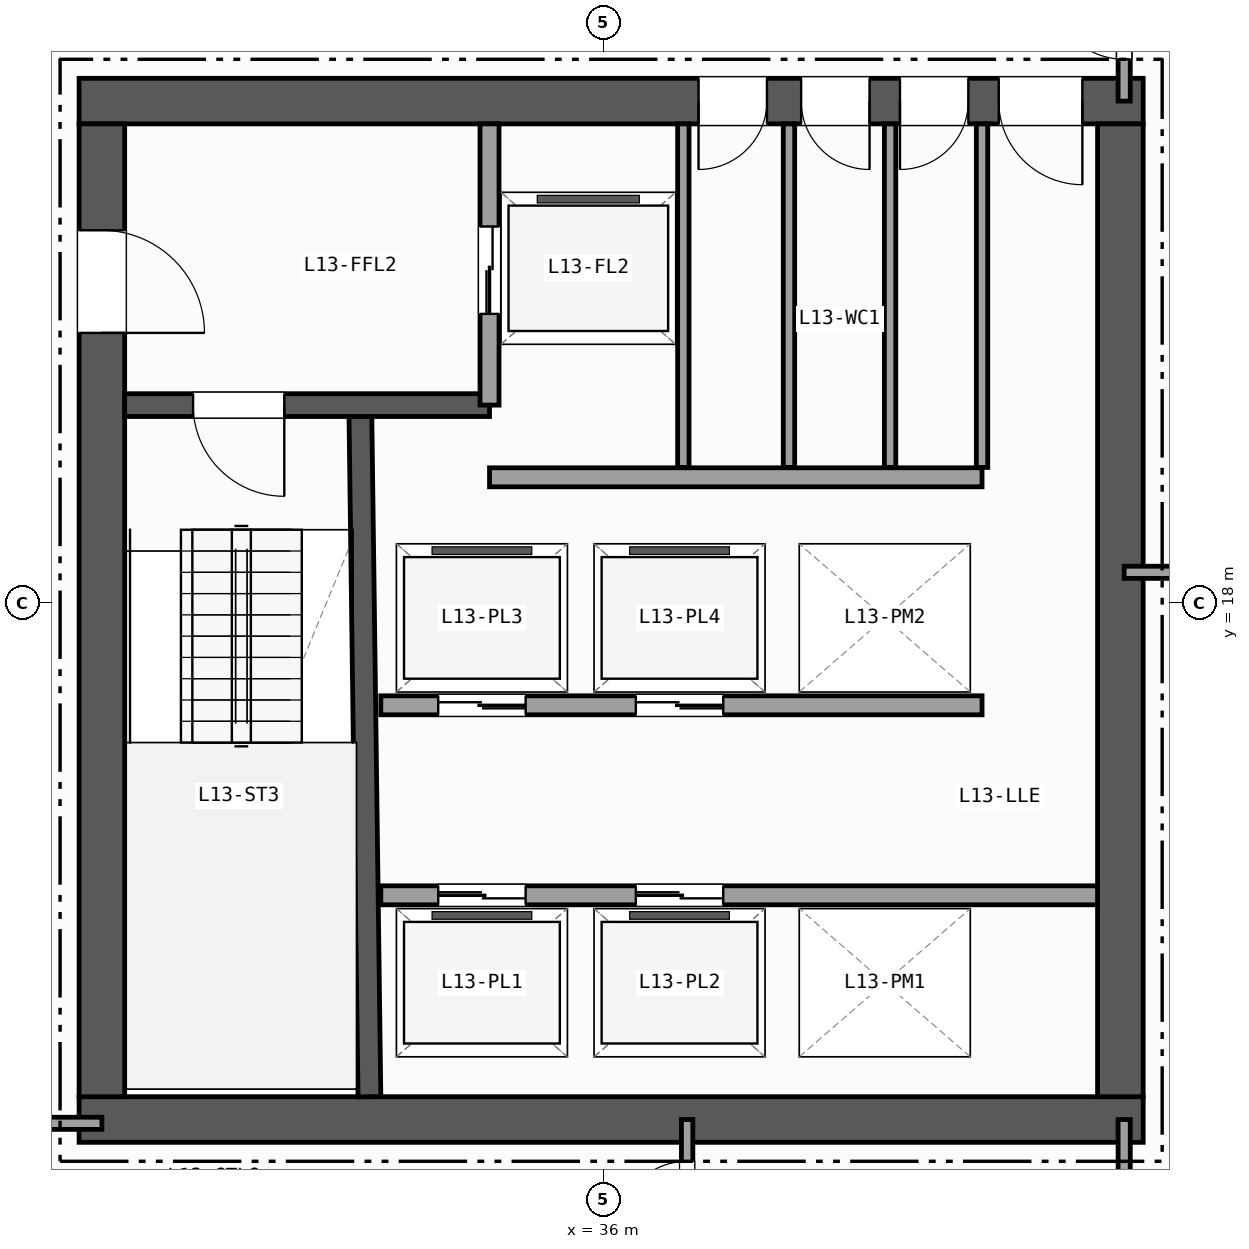
"""IFC4 building model, lengths in metres.
Left out: names, types, materials, properties, quantities, classifications, styles, units other than length and angle.
Written with IfcOpenShell. Run it as: python <this file> out.ifc"""

import sys

from ifc_helpers import new_model, si_unit, direction, frame, frame_2d, origin, place, context, subcontext, project, spatial, rectangle, extrude, element, fill, save


model = new_model("IFC4")
c1 = context("Model", 3, precision=1e-05, world=origin(), true_north=direction((0.0, 1.0)))
c2 = subcontext(c1, "Body", "Model", "MODEL_VIEW")
j1 = project(units=[si_unit("LENGTHUNIT", "METRE"), si_unit("PLANEANGLEUNIT", "RADIAN")], contexts=[c1])
p1 = place(None, origin())
s1 = spatial("IfcSite", under=j1, at=p1, CompositionType="ELEMENT")
p2 = place(p1, origin())
s2 = spatial("IfcBuilding", under=s1, at=p2, CompositionType="ELEMENT")
p3 = place(p2, frame((0.0, 0.0, 58.2)))
s3 = spatial("IfcBuildingStorey", under=s2, at=p3, CompositionType="ELEMENT", Elevation=58.2)
p4 = place(p3, frame((29.1, 11.2, 0.0), z_axis=(0.0, 0.0, 1.0), x_axis=(1.0, 0.0, 0.0)))
e1 = element("IfcWall", 1, at=p4, inside=s3, PredefinedType="SHEAR", context=c2, shape_type="SweptSolid", body=[
    extrude(rectangle(XDim=14.0, YDim=0.6, at=frame_2d((7.0, 0.0))), origin(), (0.0, 0.0, 1.0), 3.42),
])
p5 = place(p3, frame((43.1, 24.6, 0.0), z_axis=(0.0, 0.0, 1.0), x_axis=(-1.0, 0.0, 0.0)))
e2 = element("IfcWall", 2, at=p5, inside=s3, PredefinedType="SHEAR", context=c2, shape_type="SweptSolid", body=[
    extrude(rectangle(XDim=14.0, YDim=0.6, at=frame_2d((7.0, 0.0))), origin(), (0.0, 0.0, 1.0), 3.42),
])
p6 = place(p5, frame((0.8, 0.0, 0.0)))
e3 = element("IfcOpeningElement", 3, at=p6, cuts=e2, PredefinedType="OPENING", context=c2, shape_type="SweptSolid", body=[
    extrude(rectangle(XDim=1.1, YDim=2.15, at=frame_2d((0.55, 1.075))), frame((0.0, 0.31, 0.0), z_axis=(0.0, -1.0, 0.0), x_axis=(1.0, 0.0, 0.0)), (0.0, 0.0, 1.0), 0.62),
])
p7 = place(p5, frame((2.3, 0.0, 0.0)))
e4 = element("IfcOpeningElement", 4, at=p7, cuts=e2, PredefinedType="OPENING", context=c2, shape_type="SweptSolid", body=[
    extrude(rectangle(XDim=0.9, YDim=2.1, at=frame_2d((0.45, 1.05))), frame((0.0, 0.31, 0.0), z_axis=(0.0, -1.0, 0.0), x_axis=(1.0, 0.0, 0.0)), (0.0, 0.0, 1.0), 0.62),
])
p8 = place(p5, frame((3.6, 0.0, 0.0)))
e5 = element("IfcOpeningElement", 5, at=p8, cuts=e2, PredefinedType="OPENING", context=c2, shape_type="SweptSolid", body=[
    extrude(rectangle(XDim=0.9, YDim=2.1, at=frame_2d((0.45, 1.05))), frame((0.0, 0.31, 0.0), z_axis=(0.0, -1.0, 0.0), x_axis=(1.0, 0.0, 0.0)), (0.0, 0.0, 1.0), 0.62),
])
p9 = place(p5, frame((4.95, 0.0, 0.0)))
e6 = element("IfcOpeningElement", 6, at=p9, cuts=e2, PredefinedType="OPENING", context=c2, shape_type="SweptSolid", body=[
    extrude(rectangle(XDim=0.9, YDim=2.1, at=frame_2d((0.45, 1.05))), frame((0.0, 0.31, 0.0), z_axis=(0.0, -1.0, 0.0), x_axis=(1.0, 0.0, 0.0)), (0.0, 0.0, 1.0), 0.62),
])
p10 = place(p3, frame((29.4, 24.3, 0.0), z_axis=(0.0, 0.0, 1.0), x_axis=(0.0, -1.0, 0.0)))
e7 = element("IfcWall", 7, at=p10, inside=s3, PredefinedType="SHEAR", context=c2, shape_type="SweptSolid", body=[
    extrude(rectangle(XDim=12.8, YDim=0.6, at=frame_2d((6.4, 0.0))), origin(), (0.0, 0.0, 1.0), 3.42),
])
p11 = place(p10, frame((1.4, 0.0, 0.0)))
e8 = element("IfcOpeningElement", 8, at=p11, cuts=e7, PredefinedType="OPENING", context=c2, shape_type="SweptSolid", body=[
    extrude(rectangle(XDim=1.35, YDim=2.15, at=frame_2d((0.675, 1.075))), frame((0.0, 0.31, 0.0), z_axis=(0.0, -1.0, 0.0), x_axis=(1.0, 0.0, 0.0)), (0.0, 0.0, 1.0), 0.62),
])
p12 = place(p3, frame((42.8, 11.5, 0.0), z_axis=(0.0, 0.0, 1.0), x_axis=(0.0, 1.0, 0.0)))
e9 = element("IfcWall", 9, at=p12, inside=s3, PredefinedType="SHEAR", context=c2, shape_type="SweptSolid", body=[
    extrude(rectangle(XDim=12.8, YDim=0.6, at=frame_2d((6.4, 0.0))), origin(), (0.0, 0.0, 1.0), 3.42),
])
p13 = place(p3, frame((32.92, 11.5, 0.0), z_axis=(0.0, 0.0, 1.0), x_axis=(-0.013244407292, 0.999912288991, 0.0)))
e10 = element("IfcWall", 10, at=p13, inside=s3, PredefinedType="SHEAR", context=c2, shape_type="SweptSolid", body=[
    extrude(rectangle(XDim=9.051, YDim=0.3, at=frame_2d((4.525, 0.0))), origin(), (0.0, 0.0, 1.0), 3.42),
])
p14 = place(p3, frame((34.5, 20.6, 0.0), z_axis=(0.0, 0.0, 1.0), x_axis=(-1.0, 0.0, 0.0)))
e11 = element("IfcWall", 11, at=p14, inside=s3, PredefinedType="SHEAR", context=c2, shape_type="SweptSolid", body=[
    extrude(rectangle(XDim=4.8, YDim=0.3, at=frame_2d((2.4, 0.0))), origin(), (0.0, 0.0, 1.0), 3.42),
])
p15 = place(p14, frame((2.7, 0.0, 0.0)))
e12 = element("IfcOpeningElement", 12, at=p15, cuts=e11, PredefinedType="OPENING", context=c2, shape_type="SweptSolid", body=[
    extrude(rectangle(XDim=1.2, YDim=2.15, at=frame_2d((0.6, 1.075))), frame((0.0, 0.16, 0.0), z_axis=(0.0, -1.0, 0.0), x_axis=(1.0, 0.0, 0.0)), (0.0, 0.0, 1.0), 0.32),
])
p16 = place(p3, frame((34.5, 20.6, 0.0), z_axis=(0.0, 0.0, 1.0), x_axis=(0.0, 1.0, 0.0)))
e13 = element("IfcWall", 13, at=p16, inside=s3, PredefinedType="PARTITIONING", context=c2, shape_type="SweptSolid", body=[
    extrude(rectangle(XDim=3.7, YDim=0.25, at=frame_2d((1.85, 0.0))), origin(), (0.0, 0.0, 1.0), 3.42),
])
p17 = place(p16, frame((1.2, 0.0, 0.0)))
e14 = element("IfcOpeningElement", 14, at=p17, cuts=e13, PredefinedType="OPENING", context=c2, shape_type="SweptSolid", body=[
    extrude(rectangle(XDim=1.15, YDim=2.15, at=frame_2d((0.575, 1.075))), frame((0.0, 0.135, 0.0), z_axis=(0.0, -1.0, 0.0), x_axis=(1.0, 0.0, 0.0)), (0.0, 0.0, 1.0), 0.27),
])
p18 = place(p3, frame((34.5, 19.65, 0.0), z_axis=(0.0, 0.0, 1.0), x_axis=(1.0, 0.0, 0.0)))
e15 = element("IfcWall", 15, at=p18, inside=s3, PredefinedType="PARTITIONING", context=c2, shape_type="SweptSolid", body=[
    extrude(rectangle(XDim=6.48, YDim=0.25, at=frame_2d((3.24, 0.0))), origin(), (0.0, 0.0, 1.0), 3.42),
])
p19 = place(p3, frame((33.07, 14.15, 0.0), z_axis=(0.0, 0.0, 1.0), x_axis=(1.0, 0.0, 0.0)))
e16 = element("IfcWall", 16, at=p19, inside=s3, PredefinedType="PARTITIONING", context=c2, shape_type="SweptSolid", body=[
    extrude(rectangle(XDim=9.43, YDim=0.25, at=frame_2d((4.715, 0.0))), origin(), (0.0, 0.0, 1.0), 3.42),
])
p20 = place(p19, frame((0.755, 0.0, 0.0)))
e17 = element("IfcOpeningElement", 17, at=p20, cuts=e16, PredefinedType="OPENING", context=c2, shape_type="SweptSolid", body=[
    extrude(rectangle(XDim=1.15, YDim=2.15, at=frame_2d((0.575, 1.075))), frame((0.0, 0.135, 0.0), z_axis=(0.0, -1.0, 0.0), x_axis=(1.0, 0.0, 0.0)), (0.0, 0.0, 1.0), 0.27),
])
p21 = place(p19, frame((3.355, 0.0, 0.0)))
e18 = element("IfcOpeningElement", 18, at=p21, cuts=e16, PredefinedType="OPENING", context=c2, shape_type="SweptSolid", body=[
    extrude(rectangle(XDim=1.15, YDim=2.15, at=frame_2d((0.575, 1.075))), frame((0.0, 0.135, 0.0), z_axis=(0.0, -1.0, 0.0), x_axis=(1.0, 0.0, 0.0)), (0.0, 0.0, 1.0), 0.27),
])
p22 = place(p3, frame((40.98, 16.65, 0.0), z_axis=(0.0, 0.0, 1.0), x_axis=(-1.0, 0.0, 0.0)))
e19 = element("IfcWall", 19, at=p22, inside=s3, PredefinedType="PARTITIONING", context=c2, shape_type="SweptSolid", body=[
    extrude(rectangle(XDim=7.91, YDim=0.25, at=frame_2d((3.955, 0.0))), origin(), (0.0, 0.0, 1.0), 3.42),
])
p23 = place(p22, frame((6.005, 0.0, 0.0)))
e20 = element("IfcOpeningElement", 20, at=p23, cuts=e19, PredefinedType="OPENING", context=c2, shape_type="SweptSolid", body=[
    extrude(rectangle(XDim=1.15, YDim=2.15, at=frame_2d((0.575, 1.075))), frame((0.0, 0.135, 0.0), z_axis=(0.0, -1.0, 0.0), x_axis=(1.0, 0.0, 0.0)), (0.0, 0.0, 1.0), 0.27),
])
p24 = place(p22, frame((3.405, 0.0, 0.0)))
e21 = element("IfcOpeningElement", 21, at=p24, cuts=e19, PredefinedType="OPENING", context=c2, shape_type="SweptSolid", body=[
    extrude(rectangle(XDim=1.15, YDim=2.15, at=frame_2d((0.575, 1.075))), frame((0.0, 0.135, 0.0), z_axis=(0.0, -1.0, 0.0), x_axis=(1.0, 0.0, 0.0)), (0.0, 0.0, 1.0), 0.27),
])
for number, where, z_axis, x_axis in (
    (22, (37.05, 19.78, 0.0), (0.0, 0.0, 1.0), (0.0, 1.0, 0.0)),
    (23, (38.44, 19.78, 0.0), (0.0, 0.0, 1.0), (0.0, 1.0, 0.0)),
    (24, (39.77, 19.78, 0.0), (0.0, 0.0, 1.0), (0.0, 1.0, 0.0)),
    (25, (40.98, 19.78, 0.0), (0.0, 0.0, 1.0), (0.0, 1.0, 0.0)),
):
    element("IfcWall", number, at=place(p3, frame(where, z_axis=z_axis, x_axis=x_axis)), inside=s3, PredefinedType="PARTITIONING", context=c2, shape_type="SweptSolid", body=[
        extrude(rectangle(XDim=4.52, YDim=0.15, at=frame_2d((2.26, 0.0))), origin(), (0.0, 0.0, 1.0), 3.42),
    ])
p25 = place(p3, frame((24.65, 11.15, 0.0), z_axis=(0.0, 0.0, 1.0), x_axis=(1.0, 0.0, 0.0)))
e26 = element("IfcWall", 26, at=p25, inside=s3, PredefinedType="PARTITIONING", context=c2, shape_type="SweptSolid", body=[
    extrude(rectangle(XDim=4.75, YDim=0.16, at=frame_2d((2.375, 0.0))), origin(), (0.0, 0.0, 1.0), 2.792),
])
p26 = place(p25, frame((1.2, 0.0, 0.0)))
e27 = element("IfcOpeningElement", 27, at=p26, cuts=e26, PredefinedType="OPENING", context=c2, shape_type="SweptSolid", body=[
    extrude(rectangle(XDim=1.2, YDim=2.15, at=frame_2d((0.6, 1.075))), frame((0.0, 0.09, 0.0), z_axis=(0.0, -1.0, 0.0), x_axis=(1.0, 0.0, 0.0)), (0.0, 0.0, 1.0), 0.18),
])
p27 = place(p3, frame((37.1, 9.0, 0.0), z_axis=(0.0, 0.0, 1.0), x_axis=(0.0, 1.0, 0.0)))
e28 = element("IfcWall", 28, at=p27, inside=s3, PredefinedType="PARTITIONING", context=c2, shape_type="SweptSolid", body=[
    extrude(rectangle(XDim=2.2, YDim=0.15, at=frame_2d((1.1, 0.0))), origin(), (0.0, 0.0, 1.0), 2.627),
])
p28 = place(p27, frame((0.75, 0.0, 0.0)))
e29 = element("IfcOpeningElement", 29, at=p28, cuts=e28, PredefinedType="OPENING", context=c2, shape_type="SweptSolid", body=[
    extrude(rectangle(XDim=0.9, YDim=2.1, at=frame_2d((0.45, 1.05))), frame((0.0, 0.085, 0.0), z_axis=(0.0, -1.0, 0.0), x_axis=(1.0, 0.0, 0.0)), (0.0, 0.0, 1.0), 0.17),
])
p29 = place(p3, frame((42.85, 9.0, 0.0), z_axis=(0.0, 0.0, 1.0), x_axis=(0.0, 1.0, 0.0)))
e30 = element("IfcWall", 30, at=p29, inside=s3, PredefinedType="PARTITIONING", context=c2, shape_type="SweptSolid", body=[
    extrude(rectangle(XDim=2.2, YDim=0.16, at=frame_2d((1.1, 0.0))), origin(), (0.0, 0.0, 1.0), 2.627),
])
p30 = place(p3, frame((42.85, 24.6, 0.0), z_axis=(0.0, 0.0, 1.0), x_axis=(0.0, 1.0, 0.0)))
e31 = element("IfcWall", 31, at=p30, inside=s3, PredefinedType="PARTITIONING", context=c2, shape_type="SweptSolid", body=[
    extrude(rectangle(XDim=2.4, YDim=0.16, at=frame_2d((1.2, 0.0))), origin(), (0.0, 0.0, 1.0), 2.627),
])
p31 = place(p30, frame((0.55, 0.0, 0.0)))
e32 = element("IfcOpeningElement", 32, at=p31, cuts=e31, PredefinedType="OPENING", context=c2, shape_type="SweptSolid", body=[
    extrude(rectangle(XDim=0.95, YDim=2.1, at=frame_2d((0.475, 1.05))), frame((0.0, 0.09, 0.0), z_axis=(0.0, -1.0, 0.0), x_axis=(1.0, 0.0, 0.0)), (0.0, 0.0, 1.0), 0.18),
])
p32 = place(p3, frame((42.85, 18.4, 0.0), z_axis=(0.0, 0.0, 1.0), x_axis=(1.0, 0.0, 0.0)))
e33 = element("IfcWall", 33, at=p32, inside=s3, PredefinedType="PARTITIONING", context=c2, shape_type="SweptSolid", body=[
    extrude(rectangle(XDim=20.809, YDim=0.16, at=frame_2d((10.404, 0.0))), origin(), (0.0, 0.0, 1.0), 3.42),
])
p33 = place(p32, frame((2.95, 0.0, 0.0)))
e34 = element("IfcOpeningElement", 34, at=p33, cuts=e33, PredefinedType="OPENING", context=c2, shape_type="SweptSolid", body=[
    extrude(rectangle(XDim=1.0, YDim=2.1, at=frame_2d((0.5, 1.05))), frame((0.0, 0.09, 0.0), z_axis=(0.0, -1.0, 0.0), x_axis=(1.0, 0.0, 0.0)), (0.0, 0.0, 1.0), 0.18),
])
p34 = place(p15, origin())
e35 = element("IfcDoor", 35, at=p34, inside=s3, OperationType="SINGLE_SWING_LEFT", PredefinedType="DOOR", context=c2, shape_type="SweptSolid", body=[
    extrude(rectangle(XDim=1.2, YDim=2.15, at=frame_2d((0.6, 1.075))), frame((0.0, 0.025, 0.0), z_axis=(0.0, -1.0, 0.0), x_axis=(1.0, 0.0, 0.0)), (0.0, 0.0, 1.0), 0.05),
])
fill(e12, e35)
p35 = place(p11, origin())
e36 = element("IfcDoor", 36, at=p35, inside=s3, OperationType="SINGLE_SWING_RIGHT", PredefinedType="DOOR", context=c2, shape_type="SweptSolid", body=[
    extrude(rectangle(XDim=1.35, YDim=2.15, at=frame_2d((0.675, 1.075))), frame((0.0, 0.025, 0.0), z_axis=(0.0, -1.0, 0.0), x_axis=(1.0, 0.0, 0.0)), (0.0, 0.0, 1.0), 0.05),
])
fill(e8, e36)
p36 = place(p6, origin())
e37 = element("IfcDoor", 37, at=p36, inside=s3, OperationType="SINGLE_SWING_LEFT", PredefinedType="DOOR", context=c2, shape_type="SweptSolid", body=[
    extrude(rectangle(XDim=1.1, YDim=2.15, at=frame_2d((0.55, 1.075))), frame((0.0, 0.025, 0.0), z_axis=(0.0, -1.0, 0.0), x_axis=(1.0, 0.0, 0.0)), (0.0, 0.0, 1.0), 0.05),
])
fill(e3, e37)
p37 = place(p7, origin())
e38 = element("IfcDoor", 38, at=p37, inside=s3, OperationType="SINGLE_SWING_RIGHT", PredefinedType="DOOR", context=c2, shape_type="SweptSolid", body=[
    extrude(rectangle(XDim=0.9, YDim=2.1, at=frame_2d((0.45, 1.05))), frame((0.0, 0.025, 0.0), z_axis=(0.0, -1.0, 0.0), x_axis=(1.0, 0.0, 0.0)), (0.0, 0.0, 1.0), 0.05),
])
fill(e4, e38)
p38 = place(p8, origin())
e39 = element("IfcDoor", 39, at=p38, inside=s3, OperationType="SINGLE_SWING_LEFT", PredefinedType="DOOR", context=c2, shape_type="SweptSolid", body=[
    extrude(rectangle(XDim=0.9, YDim=2.1, at=frame_2d((0.45, 1.05))), frame((0.0, 0.025, 0.0), z_axis=(0.0, -1.0, 0.0), x_axis=(1.0, 0.0, 0.0)), (0.0, 0.0, 1.0), 0.05),
])
fill(e5, e39)
p39 = place(p9, origin())
e40 = element("IfcDoor", 40, at=p39, inside=s3, OperationType="SINGLE_SWING_RIGHT", PredefinedType="DOOR", context=c2, shape_type="SweptSolid", body=[
    extrude(rectangle(XDim=0.9, YDim=2.1, at=frame_2d((0.45, 1.05))), frame((0.0, 0.025, 0.0), z_axis=(0.0, -1.0, 0.0), x_axis=(1.0, 0.0, 0.0)), (0.0, 0.0, 1.0), 0.05),
])
fill(e6, e40)
p40 = place(p17, origin())
e41 = element("IfcDoor", 41, at=p40, inside=s3, OperationType="DOUBLE_DOOR_SLIDING", PredefinedType="DOOR", context=c2, shape_type="SweptSolid", body=[
    extrude(rectangle(XDim=1.15, YDim=2.15, at=frame_2d((0.575, 1.075))), frame((0.0, 0.025, 0.0), z_axis=(0.0, -1.0, 0.0), x_axis=(1.0, 0.0, 0.0)), (0.0, 0.0, 1.0), 0.05),
])
fill(e14, e41)
p41 = place(p20, origin())
e42 = element("IfcDoor", 42, at=p41, inside=s3, OperationType="DOUBLE_DOOR_SLIDING", PredefinedType="DOOR", context=c2, shape_type="SweptSolid", body=[
    extrude(rectangle(XDim=1.15, YDim=2.15, at=frame_2d((0.575, 1.075))), frame((0.0, 0.025, 0.0), z_axis=(0.0, -1.0, 0.0), x_axis=(1.0, 0.0, 0.0)), (0.0, 0.0, 1.0), 0.05),
])
fill(e17, e42)
p42 = place(p21, origin())
e43 = element("IfcDoor", 43, at=p42, inside=s3, OperationType="DOUBLE_DOOR_SLIDING", PredefinedType="DOOR", context=c2, shape_type="SweptSolid", body=[
    extrude(rectangle(XDim=1.15, YDim=2.15, at=frame_2d((0.575, 1.075))), frame((0.0, 0.025, 0.0), z_axis=(0.0, -1.0, 0.0), x_axis=(1.0, 0.0, 0.0)), (0.0, 0.0, 1.0), 0.05),
])
fill(e18, e43)
p43 = place(p23, origin())
e44 = element("IfcDoor", 44, at=p43, inside=s3, OperationType="DOUBLE_DOOR_SLIDING", PredefinedType="DOOR", context=c2, shape_type="SweptSolid", body=[
    extrude(rectangle(XDim=1.15, YDim=2.15, at=frame_2d((0.575, 1.075))), frame((0.0, 0.025, 0.0), z_axis=(0.0, -1.0, 0.0), x_axis=(1.0, 0.0, 0.0)), (0.0, 0.0, 1.0), 0.05),
])
fill(e20, e44)
p44 = place(p24, origin())
e45 = element("IfcDoor", 45, at=p44, inside=s3, OperationType="DOUBLE_DOOR_SLIDING", PredefinedType="DOOR", context=c2, shape_type="SweptSolid", body=[
    extrude(rectangle(XDim=1.15, YDim=2.15, at=frame_2d((0.575, 1.075))), frame((0.0, 0.025, 0.0), z_axis=(0.0, -1.0, 0.0), x_axis=(1.0, 0.0, 0.0)), (0.0, 0.0, 1.0), 0.05),
])
fill(e21, e45)
p45 = place(p28, origin())
e46 = element("IfcDoor", 46, at=p45, inside=s3, OperationType="SINGLE_SWING_LEFT", PredefinedType="DOOR", context=c2, shape_type="SweptSolid", body=[
    extrude(rectangle(XDim=0.9, YDim=2.1, at=frame_2d((0.45, 1.05))), frame((0.0, 0.025, 0.0), z_axis=(0.0, -1.0, 0.0), x_axis=(1.0, 0.0, 0.0)), (0.0, 0.0, 1.0), 0.05),
])
fill(e29, e46)
p46 = place(p31, origin())
e47 = element("IfcDoor", 47, at=p46, inside=s3, OperationType="SINGLE_SWING_RIGHT", PredefinedType="DOOR", context=c2, shape_type="SweptSolid", body=[
    extrude(rectangle(XDim=0.95, YDim=2.1, at=frame_2d((0.475, 1.05))), frame((0.0, 0.025, 0.0), z_axis=(0.0, -1.0, 0.0), x_axis=(1.0, 0.0, 0.0)), (0.0, 0.0, 1.0), 0.05),
])
fill(e32, e47)
save(model, sys.argv[1])
